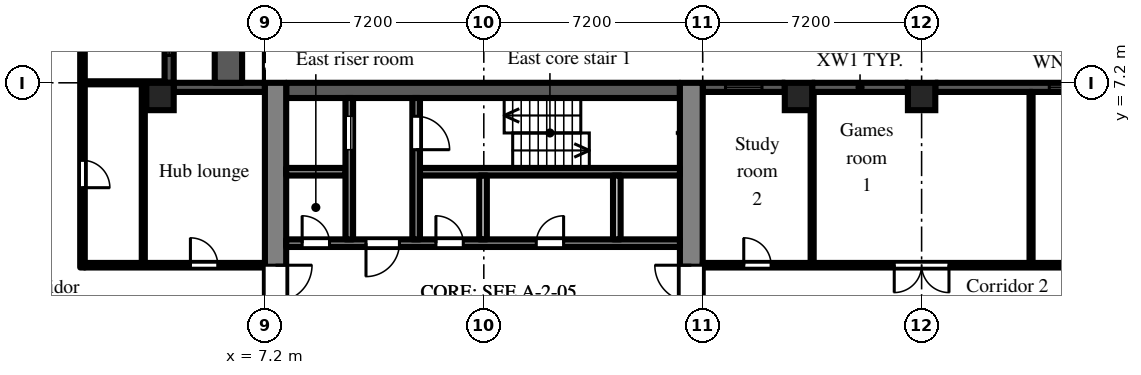
"""IFC4 building model, lengths in metres.
Left out: names, types, materials, properties, quantities, classifications, styles, units other than length and angle.
Written with IfcOpenShell. Run it as: python <this file> out.ifc"""

import sys

from ifc_helpers import new_model, si_unit, direction, frame, frame_2d, origin, origin_2d, place, context, subcontext, project, spatial, rectangle, extrude, element, fill, save


model = new_model("IFC4")
c1 = context("Model", 3, precision=1e-05, world=origin(), true_north=direction((0.0, 1.0)))
c2 = subcontext(c1, "Body", "Model", "MODEL_VIEW")
j1 = project(units=[si_unit("LENGTHUNIT", "METRE"), si_unit("PLANEANGLEUNIT", "RADIAN")], contexts=[c1])
p1 = place(None, origin())
s1 = spatial("IfcSite", under=j1, at=p1, CompositionType="ELEMENT")
p2 = place(p1, origin())
s2 = spatial("IfcBuilding", under=s1, at=p2, CompositionType="ELEMENT")
p3 = place(p2, frame((0.0, 0.0, 20.7)))
s3 = spatial("IfcBuildingStorey", under=s2, at=p3, CompositionType="ELEMENT", Elevation=20.7)
for number, where, z_axis, x_axis in (
    (1, (3.75, 6.75, 0.0), (0.0, 0.0, 1.0), (1.0, 0.0, 0.0)),
    (2, (24.75, 6.75, 0.0), (0.0, 0.0, 1.0), (1.0, 0.0, 0.0)),
    (3, (28.8, 6.75, 0.0), (0.0, 0.0, 1.0), (1.0, 0.0, 0.0)),
):
    element("IfcColumn", number, at=place(p3, frame(where, z_axis=z_axis, x_axis=x_axis)), inside=s3, PredefinedType="COLUMN", context=c2, shape_type="SweptSolid", body=[
        extrude(rectangle(XDim=0.9, YDim=0.9, at=origin_2d()), origin(), (0.0, 0.0, 1.0), 3.0),
    ])
p4 = place(p3, frame((35.55, 7.05, 0.0), z_axis=(0.0, 0.0, 1.0), x_axis=(-1.0, 0.0, 0.0)))
e4 = element("IfcWall", 4, at=p4, inside=s3, PredefinedType="SOLIDWALL", context=c2, shape_type="SweptSolid", body=[
    extrude(rectangle(XDim=6.3, YDim=0.3, at=frame_2d((3.15, 0.0))), origin(), (0.0, 0.0, 1.0), 2.1),
])
p5 = place(p4, frame((0.15, 0.0, 0.2)))
e5 = element("IfcOpeningElement", 5, at=p5, cuts=e4, PredefinedType="OPENING", context=c2, shape_type="SweptSolid", body=[
    extrude(rectangle(XDim=2.4, YDim=1.85, at=frame_2d((1.2, 0.925))), frame((0.0, 0.16, 0.0), z_axis=(0.0, -1.0, 0.0), x_axis=(1.0, 0.0, 0.0)), (0.0, 0.0, 1.0), 0.32),
])
p6 = place(p3, frame((28.35, 7.05, 0.0), z_axis=(0.0, 0.0, 1.0), x_axis=(-1.0, 0.0, 0.0)))
e6 = element("IfcWall", 6, at=p6, inside=s3, PredefinedType="SOLIDWALL", context=c2, shape_type="SweptSolid", body=[
    extrude(rectangle(XDim=3.15, YDim=0.3, at=frame_2d((1.575, 0.0))), origin(), (0.0, 0.0, 1.0), 2.1),
])
p7 = place(p3, frame((24.3, 7.05, 0.0), z_axis=(0.0, 0.0, 1.0), x_axis=(-1.0, 0.0, 0.0)))
e7 = element("IfcWall", 7, at=p7, inside=s3, PredefinedType="SOLIDWALL", context=c2, shape_type="SweptSolid", body=[
    extrude(rectangle(XDim=2.7, YDim=0.3, at=frame_2d((1.35, 0.0))), origin(), (0.0, 0.0, 1.0), 2.1),
])
p8 = place(p7, frame((0.75, 0.0, 0.2)))
e8 = element("IfcOpeningElement", 8, at=p8, cuts=e7, PredefinedType="OPENING", context=c2, shape_type="SweptSolid", body=[
    extrude(rectangle(XDim=1.2, YDim=1.85, at=frame_2d((0.6, 0.925))), frame((0.0, 0.16, 0.0), z_axis=(0.0, -1.0, 0.0), x_axis=(1.0, 0.0, 0.0)), (0.0, 0.0, 1.0), 0.32),
])
p9 = place(p3, frame((7.2, 7.05, 0.0), z_axis=(0.0, 0.0, 1.0), x_axis=(-1.0, 0.0, 0.0)))
e9 = element("IfcWall", 9, at=p9, inside=s3, PredefinedType="SOLIDWALL", context=c2, shape_type="SweptSolid", body=[
    extrude(rectangle(XDim=3.0, YDim=0.3, at=frame_2d((1.5, 0.0))), origin(), (0.0, 0.0, 1.0), 2.1),
])
p10 = place(p3, frame((4.05, 7.2, 0.0), z_axis=(0.0, 0.0, 1.0), x_axis=(0.0, 1.0, 0.0)))
e10 = element("IfcWall", 10, at=p10, inside=s3, PredefinedType="SOLIDWALL", context=c2, shape_type="SweptSolid", body=[
    extrude(rectangle(XDim=7.2, YDim=0.3, at=frame_2d((3.6, 0.0))), origin(), (0.0, 0.0, 1.0), 2.1),
])
p11 = place(p10, frame((3.0, 0.0, 0.0)))
e11 = element("IfcOpeningElement", 11, at=p11, cuts=e10, PredefinedType="OPENING", context=c2, shape_type="SweptSolid", body=[
    extrude(rectangle(XDim=1.2, YDim=2.05, at=frame_2d((0.6, 1.025))), frame((0.0, 0.16, 0.0), z_axis=(0.0, -1.0, 0.0), x_axis=(1.0, 0.0, 0.0)), (0.0, 0.0, 1.0), 0.32),
])
p12 = place(p10, frame((0.9, 0.0, 0.2)))
e12 = element("IfcOpeningElement", 12, at=p12, cuts=e10, PredefinedType="OPENING", context=c2, shape_type="SweptSolid", body=[
    extrude(rectangle(XDim=1.8, YDim=1.85, at=frame_2d((0.9, 0.925))), frame((0.0, 0.16, 0.0), z_axis=(0.0, -1.0, 0.0), x_axis=(1.0, 0.0, 0.0)), (0.0, 0.0, 1.0), 0.32),
])
p13 = place(p10, frame((4.5, 0.0, 0.2)))
e13 = element("IfcOpeningElement", 13, at=p13, cuts=e10, PredefinedType="OPENING", context=c2, shape_type="SweptSolid", body=[
    extrude(rectangle(XDim=1.8, YDim=1.85, at=frame_2d((0.9, 0.925))), frame((0.0, 0.16, 0.0), z_axis=(0.0, -1.0, 0.0), x_axis=(1.0, 0.0, 0.0)), (0.0, 0.0, 1.0), 0.32),
])
p14 = place(p3, frame((6.0, 7.2, 0.0), z_axis=(0.0, 0.0, 1.0), x_axis=(0.0, 1.0, 0.0)))
e14 = element("IfcWall", 14, at=p14, inside=s3, PredefinedType="PARAPET", context=c2, shape_type="SweptSolid", body=[
    extrude(rectangle(XDim=7.2, YDim=0.9, at=frame_2d((3.6, 0.0))), origin(), (0.0, 0.0, 1.0), 0.8),
])
p15 = place(p3, frame((7.55, -7.2, 0.0), z_axis=(0.0, 0.0, 1.0), x_axis=(0.0, 1.0, 0.0)))
e15 = element("IfcWall", 15, at=p15, inside=s3, PredefinedType="SHEAR", context=c2, shape_type="SweptSolid", body=[
    extrude(rectangle(XDim=14.4, YDim=0.7, at=frame_2d((7.2, 0.0))), origin(), (0.0, 0.0, 1.0), 2.575),
])
p16 = place(p15, frame((6.0, 0.0, 0.0)))
e16 = element("IfcOpeningElement", 16, at=p16, cuts=e15, PredefinedType="OPENING", context=c2, shape_type="SweptSolid", body=[
    extrude(rectangle(XDim=2.4, YDim=2.2, at=frame_2d((1.2, 1.1))), frame((0.0, 0.36, 0.0), z_axis=(0.0, -1.0, 0.0), x_axis=(1.0, 0.0, 0.0)), (0.0, 0.0, 1.0), 0.72),
])
p17 = place(p3, frame((21.225, -7.2, 0.0), z_axis=(0.0, 0.0, 1.0), x_axis=(0.0, 1.0, 0.0)))
e17 = element("IfcWall", 17, at=p17, inside=s3, PredefinedType="SHEAR", context=c2, shape_type="SweptSolid", body=[
    extrude(rectangle(XDim=14.4, YDim=0.75, at=frame_2d((7.2, 0.0))), origin(), (0.0, 0.0, 1.0), 2.575),
])
p18 = place(p17, frame((6.0, 0.0, 0.0)))
e18 = element("IfcOpeningElement", 18, at=p18, cuts=e17, PredefinedType="OPENING", context=c2, shape_type="SweptSolid", body=[
    extrude(rectangle(XDim=2.4, YDim=2.2, at=frame_2d((1.2, 1.1))), frame((0.0, 0.385, 0.0), z_axis=(0.0, -1.0, 0.0), x_axis=(1.0, 0.0, 0.0)), (0.0, 0.0, 1.0), 0.77),
])
p19 = place(p3, frame((7.9, 6.95, 0.0), z_axis=(0.0, 0.0, 1.0), x_axis=(1.0, 0.0, 0.0)))
e19 = element("IfcWall", 19, at=p19, inside=s3, PredefinedType="SHEAR", context=c2, shape_type="SweptSolid", body=[
    extrude(rectangle(XDim=12.95, YDim=0.5, at=frame_2d((6.475, 0.0))), origin(), (0.0, 0.0, 1.0), 2.575),
])
p20 = place(p3, frame((7.9, 1.925, 0.0), z_axis=(0.0, 0.0, 1.0), x_axis=(1.0, 0.0, 0.0)))
e20 = element("IfcWall", 20, at=p20, inside=s3, PredefinedType="SHEAR", context=c2, shape_type="SweptSolid", body=[
    extrude(rectangle(XDim=12.95, YDim=0.25, at=frame_2d((6.475, 0.0))), origin(), (0.0, 0.0, 1.0), 2.575),
])
p21 = place(p20, frame((0.525, 0.0, 0.0)))
e21 = element("IfcOpeningElement", 21, at=p21, cuts=e20, PredefinedType="OPENING", context=c2, shape_type="SweptSolid", body=[
    extrude(rectangle(XDim=0.9, YDim=2.1, at=frame_2d((0.45, 1.05))), frame((0.0, 0.135, 0.0), z_axis=(0.0, -1.0, 0.0), x_axis=(1.0, 0.0, 0.0)), (0.0, 0.0, 1.0), 0.27),
])
p22 = place(p20, frame((2.625, 0.0, 0.0)))
e22 = element("IfcOpeningElement", 22, at=p22, cuts=e20, PredefinedType="OPENING", context=c2, shape_type="SweptSolid", body=[
    extrude(rectangle(XDim=1.1, YDim=2.1, at=frame_2d((0.55, 1.05))), frame((0.0, 0.135, 0.0), z_axis=(0.0, -1.0, 0.0), x_axis=(1.0, 0.0, 0.0)), (0.0, 0.0, 1.0), 0.27),
])
p23 = place(p20, frame((4.925, 0.0, 0.0)))
e23 = element("IfcOpeningElement", 23, at=p23, cuts=e20, PredefinedType="OPENING", context=c2, shape_type="SweptSolid", body=[
    extrude(rectangle(XDim=0.9, YDim=2.1, at=frame_2d((0.45, 1.05))), frame((0.0, 0.135, 0.0), z_axis=(0.0, -1.0, 0.0), x_axis=(1.0, 0.0, 0.0)), (0.0, 0.0, 1.0), 0.27),
])
p24 = place(p20, frame((8.225, 0.0, 0.0)))
e24 = element("IfcOpeningElement", 24, at=p24, cuts=e20, PredefinedType="OPENING", context=c2, shape_type="SweptSolid", body=[
    extrude(rectangle(XDim=0.9, YDim=2.1, at=frame_2d((0.45, 1.05))), frame((0.0, 0.135, 0.0), z_axis=(0.0, -1.0, 0.0), x_axis=(1.0, 0.0, 0.0)), (0.0, 0.0, 1.0), 0.27),
])
p25 = place(p3, frame((7.9, 4.275, 0.0), z_axis=(0.0, 0.0, 1.0), x_axis=(1.0, 0.0, 0.0)))
e25 = element("IfcWall", 25, at=p25, inside=s3, PredefinedType="SHEAR", context=c2, shape_type="SweptSolid", body=[
    extrude(rectangle(XDim=1.95, YDim=0.25, at=frame_2d((0.975, 0.0))), origin(), (0.0, 0.0, 1.0), 2.575),
])
p26 = place(p3, frame((12.3, 4.275, 0.0), z_axis=(0.0, 0.0, 1.0), x_axis=(1.0, 0.0, 0.0)))
e26 = element("IfcWall", 26, at=p26, inside=s3, PredefinedType="SHEAR", context=c2, shape_type="SweptSolid", body=[
    extrude(rectangle(XDim=8.55, YDim=0.25, at=frame_2d((4.275, 0.0))), origin(), (0.0, 0.0, 1.0), 2.575),
])
p27 = place(p3, frame((9.975, 2.05, 0.0), z_axis=(0.0, 0.0, 1.0), x_axis=(0.0, 1.0, 0.0)))
e27 = element("IfcWall", 27, at=p27, inside=s3, PredefinedType="SHEAR", context=c2, shape_type="SweptSolid", body=[
    extrude(rectangle(XDim=4.65, YDim=0.25, at=frame_2d((2.325, 0.0))), origin(), (0.0, 0.0, 1.0), 2.575),
])
p28 = place(p27, frame((2.95, 0.0, 0.0)))
e28 = element("IfcOpeningElement", 28, at=p28, cuts=e27, PredefinedType="OPENING", context=c2, shape_type="SweptSolid", body=[
    extrude(rectangle(XDim=1.1, YDim=2.1, at=frame_2d((0.55, 1.05))), frame((0.0, 0.135, 0.0), z_axis=(0.0, -1.0, 0.0), x_axis=(1.0, 0.0, 0.0)), (0.0, 0.0, 1.0), 0.27),
])
p29 = place(p3, frame((12.175, 2.05, 0.0), z_axis=(0.0, 0.0, 1.0), x_axis=(0.0, 1.0, 0.0)))
e29 = element("IfcWall", 29, at=p29, inside=s3, PredefinedType="SHEAR", context=c2, shape_type="SweptSolid", body=[
    extrude(rectangle(XDim=4.65, YDim=0.25, at=frame_2d((2.325, 0.0))), origin(), (0.0, 0.0, 1.0), 2.575),
])
p30 = place(p29, frame((2.95, 0.0, 0.0)))
e30 = element("IfcOpeningElement", 30, at=p30, cuts=e29, PredefinedType="OPENING", context=c2, shape_type="SweptSolid", body=[
    extrude(rectangle(XDim=1.1, YDim=2.1, at=frame_2d((0.55, 1.05))), frame((0.0, 0.135, 0.0), z_axis=(0.0, -1.0, 0.0), x_axis=(1.0, 0.0, 0.0)), (0.0, 0.0, 1.0), 0.27),
])
for number, where, z_axis, x_axis in (
    (31, (14.375, 2.05, 0.0), (0.0, 0.0, 1.0), (0.0, 1.0, 0.0)),
    (32, (18.775, 2.05, 0.0), (0.0, 0.0, 1.0), (0.0, 1.0, 0.0)),
):
    element("IfcWall", number, at=place(p3, frame(where, z_axis=z_axis, x_axis=x_axis)), inside=s3, PredefinedType="PARTITIONING", context=c2, shape_type="SweptSolid", body=[
        extrude(rectangle(XDim=2.1, YDim=0.25, at=frame_2d((1.05, 0.0))), origin(), (0.0, 0.0, 1.0), 2.575),
    ])
p31 = place(p3, frame((1.2, 1.125, 0.0), z_axis=(0.0, 0.0, 1.0), x_axis=(0.0, 1.0, 0.0)))
e33 = element("IfcWall", 33, at=p31, inside=s3, PredefinedType="PARTITIONING", context=c2, shape_type="SweptSolid", body=[
    extrude(rectangle(XDim=35.375, YDim=0.15, at=frame_2d((17.688, 0.0))), origin(), (0.0, 0.0, 1.0), 2.575),
])
p32 = place(p31, frame((2.625, 0.0, 0.0)))
e34 = element("IfcOpeningElement", 34, at=p32, cuts=e33, PredefinedType="OPENING", context=c2, shape_type="SweptSolid", body=[
    extrude(rectangle(XDim=0.9, YDim=2.1, at=frame_2d((0.45, 1.05))), frame((0.0, 0.085, 0.0), z_axis=(0.0, -1.0, 0.0), x_axis=(1.0, 0.0, 0.0)), (0.0, 0.0, 1.0), 0.17),
])
p33 = place(p31, frame((7.425, 0.0, 0.0)))
e35 = element("IfcOpeningElement", 35, at=p33, cuts=e33, PredefinedType="OPENING", context=c2, shape_type="SweptSolid", body=[
    extrude(rectangle(XDim=0.9, YDim=2.1, at=frame_2d((0.45, 1.05))), frame((0.0, 0.085, 0.0), z_axis=(0.0, -1.0, 0.0), x_axis=(1.0, 0.0, 0.0)), (0.0, 0.0, 1.0), 0.17),
])
p34 = place(p31, frame((14.625, 0.0, 0.0)))
e36 = element("IfcOpeningElement", 36, at=p34, cuts=e33, PredefinedType="OPENING", context=c2, shape_type="SweptSolid", body=[
    extrude(rectangle(XDim=0.9, YDim=2.1, at=frame_2d((0.45, 1.05))), frame((0.0, 0.085, 0.0), z_axis=(0.0, -1.0, 0.0), x_axis=(1.0, 0.0, 0.0)), (0.0, 0.0, 1.0), 0.17),
])
p35 = place(p31, frame((32.825, 0.0, 0.0)))
e37 = element("IfcOpeningElement", 37, at=p35, cuts=e33, PredefinedType="OPENING", context=c2, shape_type="SweptSolid", body=[
    extrude(rectangle(XDim=1.0, YDim=2.1, at=frame_2d((0.5, 1.05))), frame((0.0, 0.085, 0.0), z_axis=(0.0, -1.0, 0.0), x_axis=(1.0, 0.0, 0.0)), (0.0, 0.0, 1.0), 0.17),
])
p36 = place(p3, frame((1.275, 1.2, 0.0), z_axis=(0.0, 0.0, 1.0), x_axis=(1.0, 0.0, 0.0)))
e38 = element("IfcWall", 38, at=p36, inside=s3, PredefinedType="PARTITIONING", context=c2, shape_type="SweptSolid", body=[
    extrude(rectangle(XDim=5.925, YDim=0.15, at=frame_2d((2.962, 0.0))), origin(), (0.0, 0.0, 1.0), 2.575),
])
p37 = place(p36, frame((3.475, 0.0, 0.0)))
e39 = element("IfcOpeningElement", 39, at=p37, cuts=e38, PredefinedType="OPENING", context=c2, shape_type="SweptSolid", body=[
    extrude(rectangle(XDim=0.9, YDim=2.1, at=frame_2d((0.45, 1.05))), frame((0.0, 0.085, 0.0), z_axis=(0.0, -1.0, 0.0), x_axis=(1.0, 0.0, 0.0)), (0.0, 0.0, 1.0), 0.17),
])
p38 = place(p3, frame((1.275, 7.2, 0.0), z_axis=(0.0, 0.0, 1.0), x_axis=(1.0, 0.0, 0.0)))
e40 = element("IfcWall", 40, at=p38, inside=s3, PredefinedType="PARTITIONING", context=c2, shape_type="SweptSolid", body=[
    extrude(rectangle(XDim=2.625, YDim=0.1, at=frame_2d((1.312, 0.0))), origin(), (0.0, 0.0, 1.0), 2.575),
])
p39 = place(p3, frame((3.2, 1.275, 0.0), z_axis=(0.0, 0.0, 1.0), x_axis=(0.0, 1.0, 0.0)))
e41 = element("IfcWall", 41, at=p39, inside=s3, PredefinedType="PARTITIONING", context=c2, shape_type="SweptSolid", body=[
    extrude(rectangle(XDim=5.875, YDim=0.1, at=frame_2d((2.938, 0.0))), origin(), (0.0, 0.0, 1.0), 2.575),
])
p40 = place(p3, frame((21.6, 1.2, 0.0), z_axis=(0.0, 0.0, 1.0), x_axis=(1.0, 0.0, 0.0)))
e42 = element("IfcWall", 42, at=p40, inside=s3, PredefinedType="PARTITIONING", context=c2, shape_type="SweptSolid", body=[
    extrude(rectangle(XDim=14.9, YDim=0.15, at=frame_2d((7.45, 0.0))), origin(), (0.0, 0.0, 1.0), 2.575),
])
p41 = place(p40, frame((1.35, 0.0, 0.0)))
e43 = element("IfcOpeningElement", 43, at=p41, cuts=e42, PredefinedType="OPENING", context=c2, shape_type="SweptSolid", body=[
    extrude(rectangle(XDim=0.9, YDim=2.1, at=frame_2d((0.45, 1.05))), frame((0.0, 0.085, 0.0), z_axis=(0.0, -1.0, 0.0), x_axis=(1.0, 0.0, 0.0)), (0.0, 0.0, 1.0), 0.17),
])
p42 = place(p40, frame((6.3, 0.0, 0.0)))
e44 = element("IfcOpeningElement", 44, at=p42, cuts=e42, PredefinedType="OPENING", context=c2, shape_type="SweptSolid", body=[
    extrude(rectangle(XDim=1.8, YDim=2.1, at=frame_2d((0.9, 1.05))), frame((0.0, 0.085, 0.0), z_axis=(0.0, -1.0, 0.0), x_axis=(1.0, 0.0, 0.0)), (0.0, 0.0, 1.0), 0.17),
])
p43 = place(p40, frame((11.95, 0.0, 0.0)))
e45 = element("IfcOpeningElement", 45, at=p43, cuts=e42, PredefinedType="OPENING", context=c2, shape_type="SweptSolid", body=[
    extrude(rectangle(XDim=1.8, YDim=2.1, at=frame_2d((0.9, 1.05))), frame((0.0, 0.085, 0.0), z_axis=(0.0, -1.0, 0.0), x_axis=(1.0, 0.0, 0.0)), (0.0, 0.0, 1.0), 0.17),
])
for number, where, z_axis, x_axis in (
    (46, (25.2, 1.275, 0.0), (0.0, 0.0, 1.0), (0.0, 1.0, 0.0)),
    (47, (32.4, 1.275, 0.0), (0.0, 0.0, 1.0), (0.0, 1.0, 0.0)),
):
    element("IfcWall", number, at=place(p3, frame(where, z_axis=z_axis, x_axis=x_axis)), inside=s3, PredefinedType="PARTITIONING", context=c2, shape_type="SweptSolid", body=[
        extrude(rectangle(XDim=5.625, YDim=0.1, at=frame_2d((2.812, 0.0))), origin(), (0.0, 0.0, 1.0), 2.575),
    ])
p44 = place(p5, origin())
e48 = element("IfcWindow", 48, at=p44, inside=s3, PartitioningType="SINGLE_PANEL", PredefinedType="WINDOW", context=c2, shape_type="SweptSolid", body=[
    extrude(rectangle(XDim=2.4, YDim=1.85, at=frame_2d((1.2, 0.925))), frame((0.0, 0.03, 0.0), z_axis=(0.0, -1.0, 0.0), x_axis=(1.0, 0.0, 0.0)), (0.0, 0.0, 1.0), 0.06),
])
fill(e5, e48)
p45 = place(p8, origin())
e49 = element("IfcWindow", 49, at=p45, inside=s3, PartitioningType="SINGLE_PANEL", PredefinedType="WINDOW", context=c2, shape_type="SweptSolid", body=[
    extrude(rectangle(XDim=1.2, YDim=1.85, at=frame_2d((0.6, 0.925))), frame((0.0, 0.03, 0.0), z_axis=(0.0, -1.0, 0.0), x_axis=(1.0, 0.0, 0.0)), (0.0, 0.0, 1.0), 0.06),
])
fill(e8, e49)
p46 = place(p12, origin())
e50 = element("IfcWindow", 50, at=p46, inside=s3, PartitioningType="SINGLE_PANEL", PredefinedType="WINDOW", context=c2, shape_type="SweptSolid", body=[
    extrude(rectangle(XDim=1.8, YDim=1.85, at=frame_2d((0.9, 0.925))), frame((0.0, 0.03, 0.0), z_axis=(0.0, -1.0, 0.0), x_axis=(1.0, 0.0, 0.0)), (0.0, 0.0, 1.0), 0.06),
])
fill(e12, e50)
p47 = place(p28, origin())
e51 = element("IfcDoor", 51, at=p47, inside=s3, OperationType="SLIDING_TO_LEFT", PredefinedType="DOOR", context=c2, shape_type="SweptSolid", body=[
    extrude(rectangle(XDim=1.1, YDim=2.1, at=frame_2d((0.55, 1.05))), frame((0.0, 0.025, 0.0), z_axis=(0.0, -1.0, 0.0), x_axis=(1.0, 0.0, 0.0)), (0.0, 0.0, 1.0), 0.05),
])
fill(e28, e51)
p48 = place(p30, frame((1.1, 0.0, 0.0), z_axis=(0.0, 0.0, 1.0), x_axis=(-1.0, 0.0, 0.0)))
e52 = element("IfcDoor", 52, at=p48, inside=s3, OperationType="SINGLE_SWING_RIGHT", PredefinedType="DOOR", context=c2, shape_type="SweptSolid", body=[
    extrude(rectangle(XDim=1.1, YDim=2.1, at=frame_2d((0.55, 1.05))), frame((0.0, 0.025, 0.0), z_axis=(0.0, -1.0, 0.0), x_axis=(1.0, 0.0, 0.0)), (0.0, 0.0, 1.0), 0.05),
])
fill(e30, e52)
p49 = place(p21, origin())
e53 = element("IfcDoor", 53, at=p49, inside=s3, OperationType="SINGLE_SWING_LEFT", PredefinedType="DOOR", context=c2, shape_type="SweptSolid", body=[
    extrude(rectangle(XDim=0.9, YDim=2.1, at=frame_2d((0.45, 1.05))), frame((0.0, 0.025, 0.0), z_axis=(0.0, -1.0, 0.0), x_axis=(1.0, 0.0, 0.0)), (0.0, 0.0, 1.0), 0.05),
])
fill(e21, e53)
p50 = place(p22, frame((1.1, 0.0, 0.0), z_axis=(0.0, 0.0, 1.0), x_axis=(-1.0, 0.0, 0.0)))
e54 = element("IfcDoor", 54, at=p50, inside=s3, OperationType="SINGLE_SWING_RIGHT", PredefinedType="DOOR", context=c2, shape_type="SweptSolid", body=[
    extrude(rectangle(XDim=1.1, YDim=2.1, at=frame_2d((0.55, 1.05))), frame((0.0, 0.025, 0.0), z_axis=(0.0, -1.0, 0.0), x_axis=(1.0, 0.0, 0.0)), (0.0, 0.0, 1.0), 0.05),
])
fill(e22, e54)
p51 = place(p16, frame((2.4, 0.0, 0.0), z_axis=(0.0, 0.0, 1.0), x_axis=(-1.0, 0.0, 0.0)))
e55 = element("IfcDoor", 55, at=p51, inside=s3, OperationType="DOUBLE_DOOR_DOUBLE_SWING", PredefinedType="DOOR", context=c2, shape_type="SweptSolid", body=[
    extrude(rectangle(XDim=2.4, YDim=2.2, at=frame_2d((1.2, 1.1))), frame((0.0, 0.025, 0.0), z_axis=(0.0, -1.0, 0.0), x_axis=(1.0, 0.0, 0.0)), (0.0, 0.0, 1.0), 0.05),
])
fill(e16, e55)
p52 = place(p18, origin())
e56 = element("IfcDoor", 56, at=p52, inside=s3, OperationType="DOUBLE_DOOR_DOUBLE_SWING", PredefinedType="DOOR", context=c2, shape_type="SweptSolid", body=[
    extrude(rectangle(XDim=2.4, YDim=2.2, at=frame_2d((1.2, 1.1))), frame((0.0, 0.025, 0.0), z_axis=(0.0, -1.0, 0.0), x_axis=(1.0, 0.0, 0.0)), (0.0, 0.0, 1.0), 0.05),
])
fill(e18, e56)
p53 = place(p23, origin())
e57 = element("IfcDoor", 57, at=p53, inside=s3, OperationType="SINGLE_SWING_LEFT", PredefinedType="DOOR", context=c2, shape_type="SweptSolid", body=[
    extrude(rectangle(XDim=0.9, YDim=2.1, at=frame_2d((0.45, 1.05))), frame((0.0, 0.025, 0.0), z_axis=(0.0, -1.0, 0.0), x_axis=(1.0, 0.0, 0.0)), (0.0, 0.0, 1.0), 0.05),
])
fill(e23, e57)
p54 = place(p24, origin())
e58 = element("IfcDoor", 58, at=p54, inside=s3, OperationType="SINGLE_SWING_RIGHT", PredefinedType="DOOR", context=c2, shape_type="SweptSolid", body=[
    extrude(rectangle(XDim=0.9, YDim=2.1, at=frame_2d((0.45, 1.05))), frame((0.0, 0.025, 0.0), z_axis=(0.0, -1.0, 0.0), x_axis=(1.0, 0.0, 0.0)), (0.0, 0.0, 1.0), 0.05),
])
fill(e24, e58)
p55 = place(p32, frame((0.9, 0.0, 0.0), z_axis=(0.0, 0.0, 1.0), x_axis=(-1.0, 0.0, 0.0)))
e59 = element("IfcDoor", 59, at=p55, inside=s3, OperationType="SINGLE_SWING_RIGHT", PredefinedType="DOOR", context=c2, shape_type="SweptSolid", body=[
    extrude(rectangle(XDim=0.9, YDim=2.1, at=frame_2d((0.45, 1.05))), frame((0.0, 0.025, 0.0), z_axis=(0.0, -1.0, 0.0), x_axis=(1.0, 0.0, 0.0)), (0.0, 0.0, 1.0), 0.05),
])
fill(e34, e59)
p56 = place(p37, origin())
e60 = element("IfcDoor", 60, at=p56, inside=s3, OperationType="SINGLE_SWING_LEFT", PredefinedType="DOOR", context=c2, shape_type="SweptSolid", body=[
    extrude(rectangle(XDim=0.9, YDim=2.1, at=frame_2d((0.45, 1.05))), frame((0.0, 0.025, 0.0), z_axis=(0.0, -1.0, 0.0), x_axis=(1.0, 0.0, 0.0)), (0.0, 0.0, 1.0), 0.05),
])
fill(e39, e60)
p57 = place(p41, origin())
e61 = element("IfcDoor", 61, at=p57, inside=s3, OperationType="SINGLE_SWING_LEFT", PredefinedType="DOOR", context=c2, shape_type="SweptSolid", body=[
    extrude(rectangle(XDim=0.9, YDim=2.1, at=frame_2d((0.45, 1.05))), frame((0.0, 0.025, 0.0), z_axis=(0.0, -1.0, 0.0), x_axis=(1.0, 0.0, 0.0)), (0.0, 0.0, 1.0), 0.05),
])
fill(e43, e61)
p58 = place(p42, frame((1.8, 0.0, 0.0), z_axis=(0.0, 0.0, 1.0), x_axis=(-1.0, 0.0, 0.0)))
e62 = element("IfcDoor", 62, at=p58, inside=s3, OperationType="DOUBLE_DOOR_DOUBLE_SWING", PredefinedType="DOOR", context=c2, shape_type="SweptSolid", body=[
    extrude(rectangle(XDim=1.8, YDim=2.1, at=frame_2d((0.9, 1.05))), frame((0.0, 0.025, 0.0), z_axis=(0.0, -1.0, 0.0), x_axis=(1.0, 0.0, 0.0)), (0.0, 0.0, 1.0), 0.05),
])
fill(e44, e62)
save(model, sys.argv[1])
